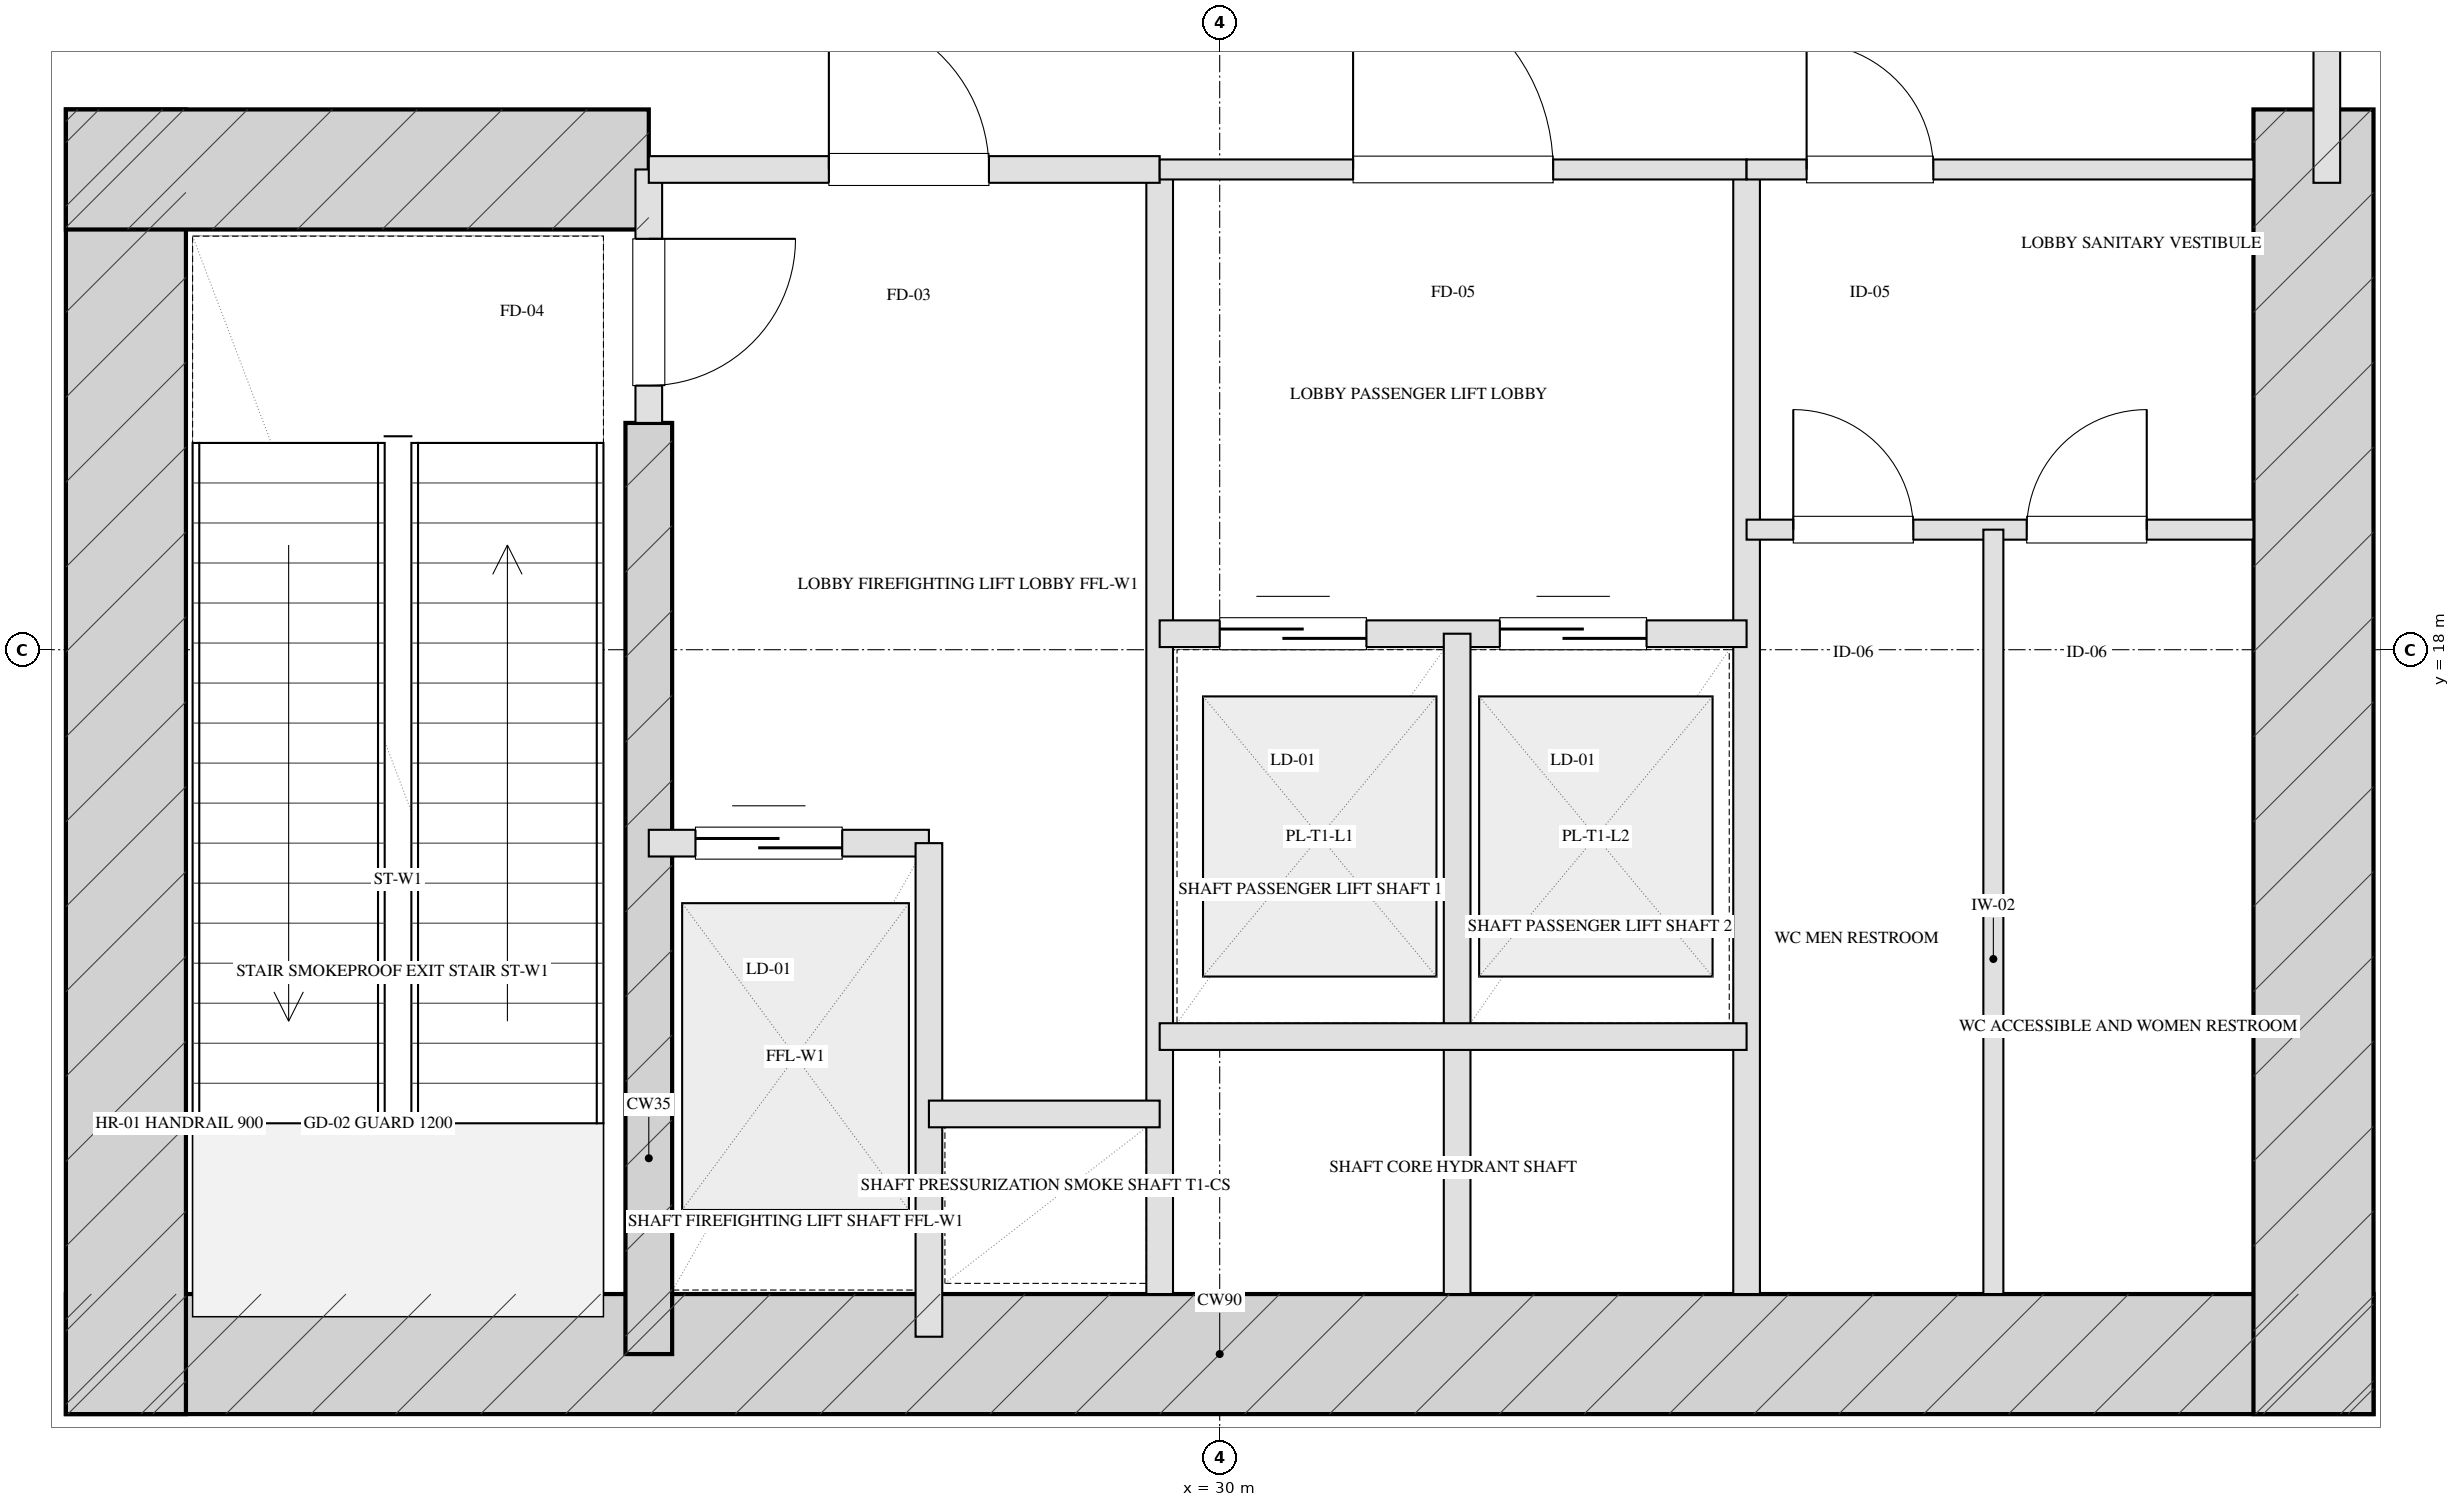
"""IFC4 building model, lengths in metres.
Left out: names, types, materials, properties, quantities, classifications, styles, units other than length and angle.
Written with IfcOpenShell. Run it as: python <this file> out.ifc"""

import sys

from ifc_helpers import new_model, si_unit, direction, frame, frame_2d, origin, place, context, subcontext, project, spatial, rectangle, extrude, element, fill, save


model = new_model("IFC4")
c1 = context("Model", 3, precision=1e-05, world=origin(), true_north=direction((0.0, 1.0)))
c2 = subcontext(c1, "Body", "Model", "MODEL_VIEW")
j1 = project(units=[si_unit("LENGTHUNIT", "METRE"), si_unit("PLANEANGLEUNIT", "RADIAN")], contexts=[c1])
p1 = place(None, origin())
s1 = spatial("IfcSite", under=j1, at=p1, CompositionType="ELEMENT")
p2 = place(p1, origin())
s2 = spatial("IfcBuilding", under=s1, at=p2, CompositionType="ELEMENT")
p3 = place(p2, origin())
s3 = spatial("IfcBuildingStorey", under=s2, at=p3, CompositionType="ELEMENT", Elevation=0.0)
p4 = place(p3, frame((21.35, 12.72, 0.0), z_axis=(0.0, 0.0, 1.0), x_axis=(1.0, 0.0, 0.0)))
e1 = element("IfcWall", 1, at=p4, inside=s3, PredefinedType="SHEAR", context=c2, shape_type="SweptSolid", body=[
    extrude(rectangle(XDim=17.3, YDim=0.9, at=frame_2d((8.65, 0.0))), origin(), (0.0, 0.0, 1.0), 6.0),
])
for number, where, z_axis, x_axis in (
    (2, (21.8, 22.05, 0.0), (0.0, 0.0, 1.0), (0.0, -1.0, 0.0)),
    (3, (38.2, 22.05, 0.0), (0.0, 0.0, 1.0), (0.0, -1.0, 0.0)),
):
    element("IfcWall", number, at=place(p3, frame(where, z_axis=z_axis, x_axis=x_axis)), inside=s3, PredefinedType="SHEAR", context=c2, shape_type="SweptSolid", body=[
        extrude(rectangle(XDim=9.78, YDim=0.9, at=frame_2d((4.89, 0.0))), origin(), (0.0, 0.0, 1.0), 6.0),
    ])
p5 = place(p3, frame((25.72, 19.7, 0.0), z_axis=(0.0, 0.0, 1.0), x_axis=(0.0, -1.0, 0.0)))
e4 = element("IfcWall", 4, at=p5, inside=s3, PredefinedType="SHEAR", context=c2, shape_type="SweptSolid", body=[
    extrude(rectangle(XDim=6.98, YDim=0.35, at=frame_2d((3.49, 0.0))), origin(), (0.0, 0.0, 1.0), 6.0),
])
p6 = place(p3, frame((21.35, 21.6, 0.0), z_axis=(0.0, 0.0, 1.0), x_axis=(1.0, 0.0, 0.0)))
e5 = element("IfcWall", 5, at=p6, inside=s3, PredefinedType="SHEAR", context=c2, shape_type="SweptSolid", body=[
    extrude(rectangle(XDim=4.37, YDim=0.9, at=frame_2d((2.185, 0.0))), origin(), (0.0, 0.0, 1.0), 6.0),
])
p7 = place(p3, frame((25.72, 21.6, 0.0), z_axis=(0.0, 0.0, 1.0), x_axis=(0.0, -1.0, 0.0)))
e6 = element("IfcWall", 6, at=p7, inside=s3, PredefinedType="PARTITIONING", context=c2, shape_type="SweptSolid", body=[
    extrude(rectangle(XDim=1.9, YDim=0.2, at=frame_2d((0.95, 0.0))), origin(), (0.0, 0.0, 1.0), 5.685),
])
p8 = place(p7, frame((0.52, 0.0, 0.0)))
e7 = element("IfcOpeningElement", 7, at=p8, cuts=e6, PredefinedType="OPENING", context=c2, shape_type="SweptSolid", body=[
    extrude(rectangle(XDim=1.1, YDim=2.05, at=frame_2d((0.55, 1.025))), frame((0.0, 0.11, 0.0), z_axis=(0.0, -1.0, 0.0), x_axis=(1.0, 0.0, 0.0)), (0.0, 0.0, 1.0), 0.22),
])
p9 = place(p3, frame((29.55, 21.6, 0.0), z_axis=(0.0, 0.0, 1.0), x_axis=(0.0, -1.0, 0.0)))
e8 = element("IfcWall", 8, at=p9, inside=s3, PredefinedType="PARTITIONING", context=c2, shape_type="SweptSolid", body=[
    extrude(rectangle(XDim=8.43, YDim=0.2, at=frame_2d((4.215, 0.0))), origin(), (0.0, 0.0, 1.0), 5.685),
])
p10 = place(p3, frame((25.72, 21.6, 0.0), z_axis=(0.0, 0.0, 1.0), x_axis=(1.0, 0.0, 0.0)))
e9 = element("IfcWall", 9, at=p10, inside=s3, PredefinedType="PARTITIONING", context=c2, shape_type="SweptSolid", body=[
    extrude(rectangle(XDim=3.83, YDim=0.2, at=frame_2d((1.915, 0.0))), origin(), (0.0, 0.0, 1.0), 5.685),
])
p11 = place(p10, frame((1.35, 0.0, 0.0)))
e10 = element("IfcOpeningElement", 10, at=p11, cuts=e9, PredefinedType="OPENING", context=c2, shape_type="SweptSolid", body=[
    extrude(rectangle(XDim=1.2, YDim=2.05, at=frame_2d((0.6, 1.025))), frame((0.0, 0.11, 0.0), z_axis=(0.0, -1.0, 0.0), x_axis=(1.0, 0.0, 0.0)), (0.0, 0.0, 1.0), 0.22),
])
p12 = place(p3, frame((25.72, 16.55, 0.0), z_axis=(0.0, 0.0, 1.0), x_axis=(1.0, 0.0, 0.0)))
e11 = element("IfcWall", 11, at=p12, inside=s3, PredefinedType="PARTITIONING", context=c2, shape_type="SweptSolid", body=[
    extrude(rectangle(XDim=2.1, YDim=0.2, at=frame_2d((1.05, 0.0))), origin(), (0.0, 0.0, 1.0), 5.685),
])
p13 = place(p12, frame((0.35, 0.0, 0.0)))
e12 = element("IfcOpeningElement", 12, at=p13, cuts=e11, PredefinedType="OPENING", context=c2, shape_type="SweptSolid", body=[
    extrude(rectangle(XDim=1.1, YDim=2.05, at=frame_2d((0.55, 1.025))), frame((0.0, 0.11, 0.0), z_axis=(0.0, -1.0, 0.0), x_axis=(1.0, 0.0, 0.0)), (0.0, 0.0, 1.0), 0.22),
])
p14 = place(p3, frame((27.82, 16.55, 0.0), z_axis=(0.0, 0.0, 1.0), x_axis=(0.0, -1.0, 0.0)))
e13 = element("IfcWall", 13, at=p14, inside=s3, PredefinedType="PARTITIONING", context=c2, shape_type="SweptSolid", body=[
    extrude(rectangle(XDim=3.7, YDim=0.2, at=frame_2d((1.85, 0.0))), origin(), (0.0, 0.0, 1.0), 5.685),
])
p15 = place(p3, frame((27.82, 14.52, 0.0), z_axis=(0.0, 0.0, 1.0), x_axis=(1.0, 0.0, 0.0)))
e14 = element("IfcWall", 14, at=p15, inside=s3, PredefinedType="PARTITIONING", context=c2, shape_type="SweptSolid", body=[
    extrude(rectangle(XDim=1.73, YDim=0.2, at=frame_2d((0.865, 0.0))), origin(), (0.0, 0.0, 1.0), 5.685),
])
p16 = place(p3, frame((33.95, 21.6, 0.0), z_axis=(0.0, 0.0, 1.0), x_axis=(0.0, -1.0, 0.0)))
e15 = element("IfcWall", 15, at=p16, inside=s3, PredefinedType="PARTITIONING", context=c2, shape_type="SweptSolid", body=[
    extrude(rectangle(XDim=8.43, YDim=0.2, at=frame_2d((4.215, 0.0))), origin(), (0.0, 0.0, 1.0), 5.685),
])
p17 = place(p3, frame((29.55, 21.6, 0.0), z_axis=(0.0, 0.0, 1.0), x_axis=(1.0, 0.0, 0.0)))
e16 = element("IfcWall", 16, at=p17, inside=s3, PredefinedType="PARTITIONING", context=c2, shape_type="SweptSolid", body=[
    extrude(rectangle(XDim=4.4, YDim=0.15, at=frame_2d((2.2, 0.0))), origin(), (0.0, 0.0, 1.0), 5.685),
])
p18 = place(p17, frame((1.45, 0.0, 0.0)))
e17 = element("IfcOpeningElement", 17, at=p18, cuts=e16, PredefinedType="OPENING", context=c2, shape_type="SweptSolid", body=[
    extrude(rectangle(XDim=1.5, YDim=2.05, at=frame_2d((0.75, 1.025))), frame((0.0, 0.085, 0.0), z_axis=(0.0, -1.0, 0.0), x_axis=(1.0, 0.0, 0.0)), (0.0, 0.0, 1.0), 0.17),
])
p19 = place(p3, frame((29.55, 18.12, 0.0), z_axis=(0.0, 0.0, 1.0), x_axis=(1.0, 0.0, 0.0)))
e18 = element("IfcWall", 18, at=p19, inside=s3, PredefinedType="PARTITIONING", context=c2, shape_type="SweptSolid", body=[
    extrude(rectangle(XDim=4.4, YDim=0.2, at=frame_2d((2.2, 0.0))), origin(), (0.0, 0.0, 1.0), 5.685),
])
p20 = place(p19, frame((0.45, 0.0, 0.0)))
e19 = element("IfcOpeningElement", 19, at=p20, cuts=e18, PredefinedType="OPENING", context=c2, shape_type="SweptSolid", body=[
    extrude(rectangle(XDim=1.1, YDim=2.05, at=frame_2d((0.55, 1.025))), frame((0.0, 0.11, 0.0), z_axis=(0.0, -1.0, 0.0), x_axis=(1.0, 0.0, 0.0)), (0.0, 0.0, 1.0), 0.22),
])
p21 = place(p19, frame((2.55, 0.0, 0.0)))
e20 = element("IfcOpeningElement", 20, at=p21, cuts=e18, PredefinedType="OPENING", context=c2, shape_type="SweptSolid", body=[
    extrude(rectangle(XDim=1.1, YDim=2.05, at=frame_2d((0.55, 1.025))), frame((0.0, 0.11, 0.0), z_axis=(0.0, -1.0, 0.0), x_axis=(1.0, 0.0, 0.0)), (0.0, 0.0, 1.0), 0.22),
])
p22 = place(p3, frame((31.78, 18.12, 0.0), z_axis=(0.0, 0.0, 1.0), x_axis=(0.0, -1.0, 0.0)))
e21 = element("IfcWall", 21, at=p22, inside=s3, PredefinedType="PARTITIONING", context=c2, shape_type="SweptSolid", body=[
    extrude(rectangle(XDim=4.95, YDim=0.2, at=frame_2d((2.475, 0.0))), origin(), (0.0, 0.0, 1.0), 5.685),
])
p23 = place(p3, frame((29.55, 15.1, 0.0), z_axis=(0.0, 0.0, 1.0), x_axis=(1.0, 0.0, 0.0)))
e22 = element("IfcWall", 22, at=p23, inside=s3, PredefinedType="PARTITIONING", context=c2, shape_type="SweptSolid", body=[
    extrude(rectangle(XDim=4.4, YDim=0.2, at=frame_2d((2.2, 0.0))), origin(), (0.0, 0.0, 1.0), 5.685),
])
p24 = place(p3, frame((33.95, 21.6, 0.0), z_axis=(0.0, 0.0, 1.0), x_axis=(1.0, 0.0, 0.0)))
e23 = element("IfcWall", 23, at=p24, inside=s3, PredefinedType="PARTITIONING", context=c2, shape_type="SweptSolid", body=[
    extrude(rectangle(XDim=3.8, YDim=0.15, at=frame_2d((1.9, 0.0))), origin(), (0.0, 0.0, 1.0), 5.685),
])
p25 = place(p24, frame((0.45, 0.0, 0.0)))
e24 = element("IfcOpeningElement", 24, at=p25, cuts=e23, PredefinedType="OPENING", context=c2, shape_type="SweptSolid", body=[
    extrude(rectangle(XDim=0.95, YDim=2.05, at=frame_2d((0.475, 1.025))), frame((0.0, 0.085, 0.0), z_axis=(0.0, -1.0, 0.0), x_axis=(1.0, 0.0, 0.0)), (0.0, 0.0, 1.0), 0.17),
])
p26 = place(p3, frame((33.95, 18.9, 0.0), z_axis=(0.0, 0.0, 1.0), x_axis=(1.0, 0.0, 0.0)))
e25 = element("IfcWall", 25, at=p26, inside=s3, PredefinedType="PARTITIONING", context=c2, shape_type="SweptSolid", body=[
    extrude(rectangle(XDim=3.8, YDim=0.15, at=frame_2d((1.9, 0.0))), origin(), (0.0, 0.0, 1.0), 5.685),
])
p27 = place(p26, frame((0.35, 0.0, 0.0)))
e26 = element("IfcOpeningElement", 26, at=p27, cuts=e25, PredefinedType="OPENING", context=c2, shape_type="SweptSolid", body=[
    extrude(rectangle(XDim=0.9, YDim=2.05, at=frame_2d((0.45, 1.025))), frame((0.0, 0.085, 0.0), z_axis=(0.0, -1.0, 0.0), x_axis=(1.0, 0.0, 0.0)), (0.0, 0.0, 1.0), 0.17),
])
p28 = place(p26, frame((2.1, 0.0, 0.0)))
e27 = element("IfcOpeningElement", 27, at=p28, cuts=e25, PredefinedType="OPENING", context=c2, shape_type="SweptSolid", body=[
    extrude(rectangle(XDim=0.9, YDim=2.05, at=frame_2d((0.45, 1.025))), frame((0.0, 0.085, 0.0), z_axis=(0.0, -1.0, 0.0), x_axis=(1.0, 0.0, 0.0)), (0.0, 0.0, 1.0), 0.17),
])
p29 = place(p3, frame((35.8, 18.9, 0.0), z_axis=(0.0, 0.0, 1.0), x_axis=(0.0, -1.0, 0.0)))
e28 = element("IfcWall", 28, at=p29, inside=s3, PredefinedType="PARTITIONING", context=c2, shape_type="SweptSolid", body=[
    extrude(rectangle(XDim=5.73, YDim=0.15, at=frame_2d((2.865, 0.0))), origin(), (0.0, 0.0, 1.0), 5.685),
])
p30 = place(p3, frame((38.3, 21.5, 0.0), z_axis=(0.0, 0.0, 1.0), x_axis=(0.0, 1.0, 0.0)))
e29 = element("IfcWall", 29, at=p30, inside=s3, PredefinedType="PARTITIONING", context=c2, shape_type="SweptSolid", body=[
    extrude(rectangle(XDim=2.75, YDim=0.2, at=frame_2d((1.375, 0.0))), origin(), (0.0, 0.0, 1.0), 5.685),
])
p31 = place(p8, origin())
e30 = element("IfcDoor", 30, at=p31, inside=s3, OperationType="SINGLE_SWING_LEFT", PredefinedType="DOOR", context=c2, shape_type="SweptSolid", body=[
    extrude(rectangle(XDim=1.1, YDim=2.05, at=frame_2d((0.55, 1.025))), frame((0.0, 0.025, 0.0), z_axis=(0.0, -1.0, 0.0), x_axis=(1.0, 0.0, 0.0)), (0.0, 0.0, 1.0), 0.05),
])
fill(e7, e30)
p32 = place(p11, origin())
e31 = element("IfcDoor", 31, at=p32, inside=s3, OperationType="SINGLE_SWING_LEFT", PredefinedType="DOOR", context=c2, shape_type="SweptSolid", body=[
    extrude(rectangle(XDim=1.2, YDim=2.05, at=frame_2d((0.6, 1.025))), frame((0.0, 0.025, 0.0), z_axis=(0.0, -1.0, 0.0), x_axis=(1.0, 0.0, 0.0)), (0.0, 0.0, 1.0), 0.05),
])
fill(e10, e31)
p33 = place(p13, origin())
e32 = element("IfcDoor", 32, at=p33, inside=s3, OperationType="DOUBLE_DOOR_SLIDING", PredefinedType="DOOR", context=c2, shape_type="SweptSolid", body=[
    extrude(rectangle(XDim=1.1, YDim=2.05, at=frame_2d((0.55, 1.025))), frame((0.0, 0.025, 0.0), z_axis=(0.0, -1.0, 0.0), x_axis=(1.0, 0.0, 0.0)), (0.0, 0.0, 1.0), 0.05),
])
fill(e12, e32)
p34 = place(p18, origin())
e33 = element("IfcDoor", 33, at=p34, inside=s3, OperationType="SINGLE_SWING_LEFT", PredefinedType="DOOR", context=c2, shape_type="SweptSolid", body=[
    extrude(rectangle(XDim=1.5, YDim=2.05, at=frame_2d((0.75, 1.025))), frame((0.0, 0.025, 0.0), z_axis=(0.0, -1.0, 0.0), x_axis=(1.0, 0.0, 0.0)), (0.0, 0.0, 1.0), 0.05),
])
fill(e17, e33)
p35 = place(p20, origin())
e34 = element("IfcDoor", 34, at=p35, inside=s3, OperationType="DOUBLE_DOOR_SLIDING", PredefinedType="DOOR", context=c2, shape_type="SweptSolid", body=[
    extrude(rectangle(XDim=1.1, YDim=2.05, at=frame_2d((0.55, 1.025))), frame((0.0, 0.025, 0.0), z_axis=(0.0, -1.0, 0.0), x_axis=(1.0, 0.0, 0.0)), (0.0, 0.0, 1.0), 0.05),
])
fill(e19, e34)
p36 = place(p21, origin())
e35 = element("IfcDoor", 35, at=p36, inside=s3, OperationType="DOUBLE_DOOR_SLIDING", PredefinedType="DOOR", context=c2, shape_type="SweptSolid", body=[
    extrude(rectangle(XDim=1.1, YDim=2.05, at=frame_2d((0.55, 1.025))), frame((0.0, 0.025, 0.0), z_axis=(0.0, -1.0, 0.0), x_axis=(1.0, 0.0, 0.0)), (0.0, 0.0, 1.0), 0.05),
])
fill(e20, e35)
p37 = place(p25, origin())
e36 = element("IfcDoor", 36, at=p37, inside=s3, OperationType="SINGLE_SWING_LEFT", PredefinedType="DOOR", context=c2, shape_type="SweptSolid", body=[
    extrude(rectangle(XDim=0.95, YDim=2.05, at=frame_2d((0.475, 1.025))), frame((0.0, 0.025, 0.0), z_axis=(0.0, -1.0, 0.0), x_axis=(1.0, 0.0, 0.0)), (0.0, 0.0, 1.0), 0.05),
])
fill(e24, e36)
p38 = place(p27, origin())
e37 = element("IfcDoor", 37, at=p38, inside=s3, OperationType="SINGLE_SWING_LEFT", PredefinedType="DOOR", context=c2, shape_type="SweptSolid", body=[
    extrude(rectangle(XDim=0.9, YDim=2.05, at=frame_2d((0.45, 1.025))), frame((0.0, 0.025, 0.0), z_axis=(0.0, -1.0, 0.0), x_axis=(1.0, 0.0, 0.0)), (0.0, 0.0, 1.0), 0.05),
])
fill(e26, e37)
p39 = place(p28, origin())
e38 = element("IfcDoor", 38, at=p39, inside=s3, OperationType="SINGLE_SWING_RIGHT", PredefinedType="DOOR", context=c2, shape_type="SweptSolid", body=[
    extrude(rectangle(XDim=0.9, YDim=2.05, at=frame_2d((0.45, 1.025))), frame((0.0, 0.025, 0.0), z_axis=(0.0, -1.0, 0.0), x_axis=(1.0, 0.0, 0.0)), (0.0, 0.0, 1.0), 0.05),
])
fill(e27, e38)
save(model, sys.argv[1])
